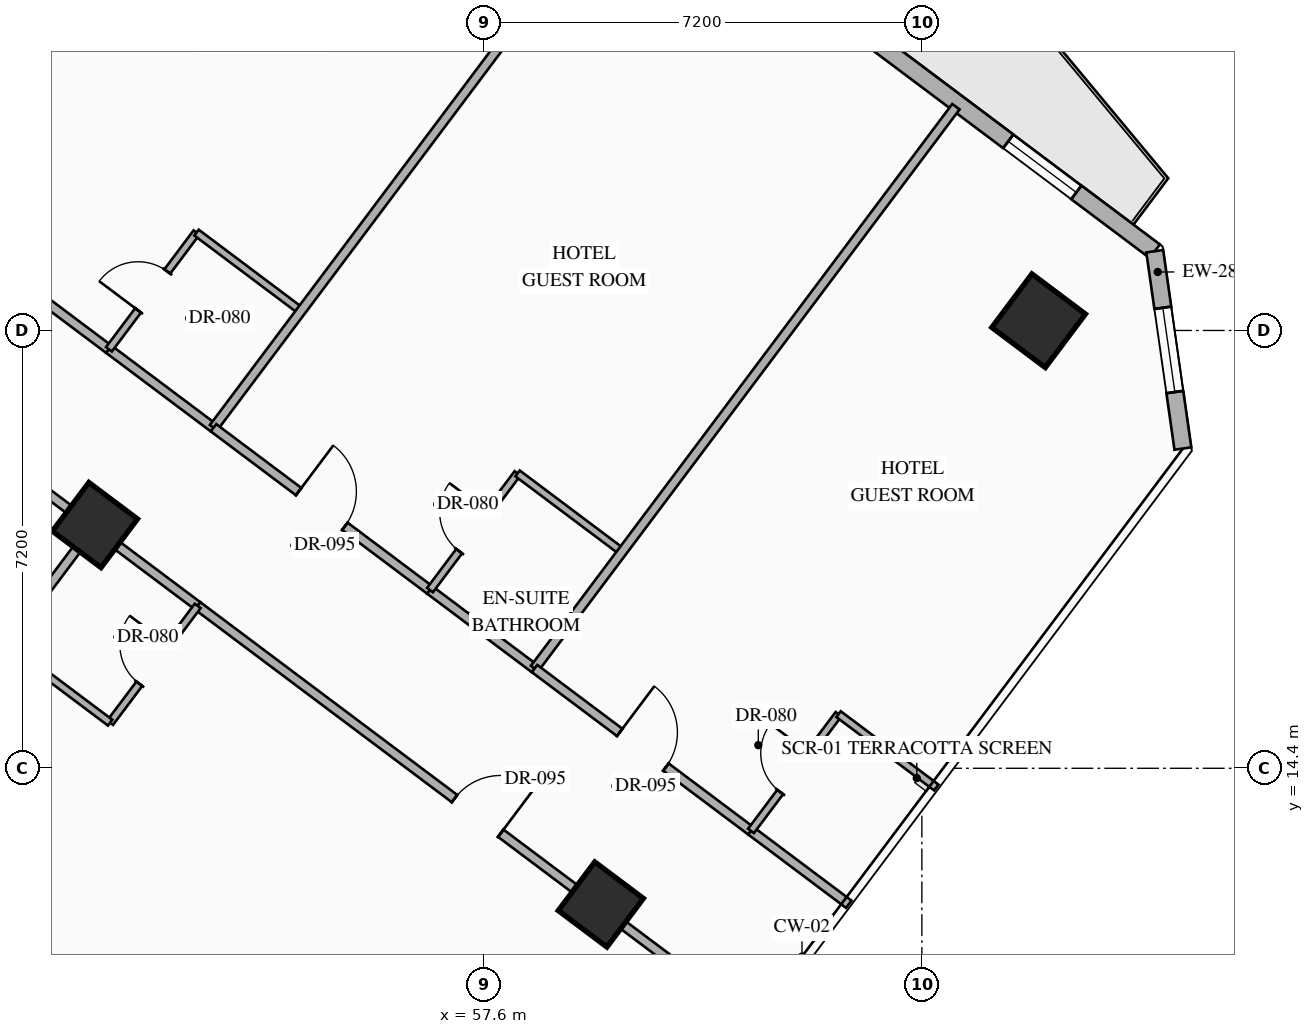
"""IFC4 building model, lengths in metres.
Left out: names, types, materials, properties, quantities, classifications, styles, units other than length and angle.
Written with IfcOpenShell. Run it as: python <this file> out.ifc"""

import sys

from ifc_helpers import new_model, si_unit, direction, frame, frame_2d, origin, origin_2d, place, context, subcontext, project, spatial, rectangle, hollow_rectangle, extrude, element, fill, save


model = new_model("IFC4")
c1 = context("Model", 3, precision=1e-05, world=origin(), true_north=direction((0.0, 1.0)))
c2 = subcontext(c1, "Body", "Model", "MODEL_VIEW")
j1 = project(units=[si_unit("LENGTHUNIT", "METRE"), si_unit("PLANEANGLEUNIT", "RADIAN")], contexts=[c1])
p1 = place(None, origin())
s1 = spatial("IfcSite", under=j1, at=p1, CompositionType="ELEMENT")
p2 = place(p1, origin())
s2 = spatial("IfcBuilding", under=s1, at=p2, CompositionType="ELEMENT")
p3 = place(p2, frame((0.0, 0.0, 39.95)))
s3 = spatial("IfcBuildingStorey", under=s2, at=p3, CompositionType="ELEMENT", Elevation=39.95)
p4 = place(p3, frame((51.2, 18.4, 0.0), z_axis=(0.0, 0.0, 1.0), x_axis=(0.799999996291, -0.600000004945, 0.0)))
e1 = element("IfcColumn", 1, at=p4, inside=s3, PredefinedType="COLUMN", context=c2, shape_type="SweptSolid", body=[
    extrude(hollow_rectangle(XDim=1.0, YDim=1.0, WallThickness=0.038, at=origin_2d()), origin(), (0.0, 0.0, 1.0), 3.35),
])
p5 = place(p3, frame((66.72, 21.76, 0.0), z_axis=(0.0, 0.0, 1.0), x_axis=(0.799999996291, -0.600000004945, 0.0)))
e2 = element("IfcColumn", 2, at=p5, inside=s3, PredefinedType="COLUMN", context=c2, shape_type="SweptSolid", body=[
    extrude(hollow_rectangle(XDim=1.1, YDim=1.1, WallThickness=0.04, at=origin_2d()), origin(), (0.0, 0.0, 1.0), 3.35),
])
p6 = place(p3, frame((59.52, 12.16, 0.0), z_axis=(0.0, 0.0, 1.0), x_axis=(0.799999996291, -0.600000004945, 0.0)))
e3 = element("IfcColumn", 3, at=p6, inside=s3, PredefinedType="COLUMN", context=c2, shape_type="SweptSolid", body=[
    extrude(hollow_rectangle(XDim=1.0, YDim=1.0, WallThickness=0.038, at=origin_2d()), origin(), (0.0, 0.0, 1.0), 3.35),
])
p7 = place(p3, frame((44.86, 40.73, 0.0), z_axis=(0.0, 0.0, 1.0), x_axis=(0.800006902154, -0.599990797017, 0.0)))
e4 = element("IfcWall", 4, at=p7, inside=s3, PredefinedType="STANDARD", context=c2, shape_type="SweptSolid", body=[
    extrude(rectangle(XDim=29.712, YDim=0.28, at=frame_2d((14.856, 0.0))), origin(), (0.0, 0.0, 1.0), 3.13),
])
p8 = place(p7, frame((14.249, 0.0, 0.0)))
e5 = element("IfcOpeningElement", 5, at=p8, cuts=e4, PredefinedType="OPENING", context=c2, shape_type="SweptSolid", body=[
    extrude(rectangle(XDim=1.1, YDim=2.2, at=frame_2d((0.55, 1.1))), frame((0.0, 0.15, 0.0), z_axis=(0.0, -1.0, 0.0), x_axis=(1.0, 0.0, 0.0)), (0.0, 0.0, 1.0), 0.3),
])
p9 = place(p7, frame((1.612, 0.0, 0.85)))
e6 = element("IfcOpeningElement", 6, at=p9, cuts=e4, PredefinedType="OPENING", context=c2, shape_type="SweptSolid", body=[
    extrude(rectangle(XDim=1.4, YDim=1.8, at=frame_2d((0.7, 0.9))), frame((0.0, 0.15, 0.0), z_axis=(0.0, -1.0, 0.0), x_axis=(1.0, 0.0, 0.0)), (0.0, 0.0, 1.0), 0.3),
])
p10 = place(p7, frame((5.667, 0.0, 0.85)))
e7 = element("IfcOpeningElement", 7, at=p10, cuts=e4, PredefinedType="OPENING", context=c2, shape_type="SweptSolid", body=[
    extrude(rectangle(XDim=1.4, YDim=1.8, at=frame_2d((0.7, 0.9))), frame((0.0, 0.15, 0.0), z_axis=(0.0, -1.0, 0.0), x_axis=(1.0, 0.0, 0.0)), (0.0, 0.0, 1.0), 0.3),
])
p11 = place(p7, frame((9.912, 0.0, 0.85)))
e8 = element("IfcOpeningElement", 8, at=p11, cuts=e4, PredefinedType="OPENING", context=c2, shape_type="SweptSolid", body=[
    extrude(rectangle(XDim=1.4, YDim=1.8, at=frame_2d((0.7, 0.9))), frame((0.0, 0.15, 0.0), z_axis=(0.0, -1.0, 0.0), x_axis=(1.0, 0.0, 0.0)), (0.0, 0.0, 1.0), 0.3),
])
p12 = place(p7, frame((19.743, 0.0, 0.85)))
e9 = element("IfcOpeningElement", 9, at=p12, cuts=e4, PredefinedType="OPENING", context=c2, shape_type="SweptSolid", body=[
    extrude(rectangle(XDim=1.4, YDim=1.8, at=frame_2d((0.7, 0.9))), frame((0.0, 0.15, 0.0), z_axis=(0.0, -1.0, 0.0), x_axis=(1.0, 0.0, 0.0)), (0.0, 0.0, 1.0), 0.3),
])
p13 = place(p7, frame((22.645, 0.0, 0.85)))
e10 = element("IfcOpeningElement", 10, at=p13, cuts=e4, PredefinedType="OPENING", context=c2, shape_type="SweptSolid", body=[
    extrude(rectangle(XDim=1.4, YDim=1.8, at=frame_2d((0.7, 0.9))), frame((0.0, 0.15, 0.0), z_axis=(0.0, -1.0, 0.0), x_axis=(1.0, 0.0, 0.0)), (0.0, 0.0, 1.0), 0.3),
])
p14 = place(p7, frame((26.7, 0.0, 0.85)))
e11 = element("IfcOpeningElement", 11, at=p14, cuts=e4, PredefinedType="OPENING", context=c2, shape_type="SweptSolid", body=[
    extrude(rectangle(XDim=1.4, YDim=1.8, at=frame_2d((0.7, 0.9))), frame((0.0, 0.15, 0.0), z_axis=(0.0, -1.0, 0.0), x_axis=(1.0, 0.0, 0.0)), (0.0, 0.0, 1.0), 0.3),
])
p15 = place(p3, frame((68.63, 22.903, 0.0), z_axis=(0.0, 0.0, 1.0), x_axis=(0.141285803956, -0.989968848803, 0.0)))
e12 = element("IfcWall", 12, at=p15, inside=s3, PredefinedType="STANDARD", context=c2, shape_type="SweptSolid", body=[
    extrude(rectangle(XDim=3.278, YDim=0.28, at=frame_2d((1.639, 0.0))), origin(), (0.0, 0.0, 1.0), 3.13),
])
p16 = place(p15, frame((0.939, 0.0, 0.85)))
e13 = element("IfcOpeningElement", 13, at=p16, cuts=e12, PredefinedType="OPENING", context=c2, shape_type="SweptSolid", body=[
    extrude(rectangle(XDim=1.4, YDim=1.8, at=frame_2d((0.7, 0.9))), frame((0.0, 0.15, 0.0), z_axis=(0.0, -1.0, 0.0), x_axis=(1.0, 0.0, 0.0)), (0.0, 0.0, 1.0), 0.3),
])
p17 = place(p3, frame((53.318, 2.487, 0.0), z_axis=(0.0, 0.0, 1.0), x_axis=(-0.800004174678, 0.599994433723, 0.0)))
e14 = element("IfcWall", 14, at=p17, inside=s3, PredefinedType="STANDARD", context=c2, shape_type="SweptSolid", body=[
    extrude(rectangle(XDim=35.089, YDim=0.28, at=frame_2d((17.544, 0.0))), origin(), (0.0, 0.0, 1.0), 3.13),
])
p18 = place(p17, frame((1.931, 0.0, 0.85)))
e15 = element("IfcOpeningElement", 15, at=p18, cuts=e14, PredefinedType="OPENING", context=c2, shape_type="SweptSolid", body=[
    extrude(rectangle(XDim=1.4, YDim=1.8, at=frame_2d((0.7, 0.9))), frame((0.0, 0.15, 0.0), z_axis=(0.0, -1.0, 0.0), x_axis=(1.0, 0.0, 0.0)), (0.0, 0.0, 1.0), 0.3),
])
p19 = place(p17, frame((6.819, 0.0, 0.85)))
e16 = element("IfcOpeningElement", 16, at=p19, cuts=e14, PredefinedType="OPENING", context=c2, shape_type="SweptSolid", body=[
    extrude(rectangle(XDim=1.4, YDim=1.8, at=frame_2d((0.7, 0.9))), frame((0.0, 0.15, 0.0), z_axis=(0.0, -1.0, 0.0), x_axis=(1.0, 0.0, 0.0)), (0.0, 0.0, 1.0), 0.3),
])
p20 = place(p17, frame((11.832, 0.0, 0.85)))
e17 = element("IfcOpeningElement", 17, at=p20, cuts=e14, PredefinedType="OPENING", context=c2, shape_type="SweptSolid", body=[
    extrude(rectangle(XDim=1.4, YDim=1.8, at=frame_2d((0.7, 0.9))), frame((0.0, 0.15, 0.0), z_axis=(0.0, -1.0, 0.0), x_axis=(1.0, 0.0, 0.0)), (0.0, 0.0, 1.0), 0.3),
])
p21 = place(p17, frame((17.647, 0.0, 0.85)))
e18 = element("IfcOpeningElement", 18, at=p21, cuts=e14, PredefinedType="OPENING", context=c2, shape_type="SweptSolid", body=[
    extrude(rectangle(XDim=1.4, YDim=1.8, at=frame_2d((0.7, 0.9))), frame((0.0, 0.15, 0.0), z_axis=(0.0, -1.0, 0.0), x_axis=(1.0, 0.0, 0.0)), (0.0, 0.0, 1.0), 0.3),
])
p22 = place(p17, frame((21.857, 0.0, 0.85)))
e19 = element("IfcOpeningElement", 19, at=p22, cuts=e14, PredefinedType="OPENING", context=c2, shape_type="SweptSolid", body=[
    extrude(rectangle(XDim=1.4, YDim=1.8, at=frame_2d((0.7, 0.9))), frame((0.0, 0.15, 0.0), z_axis=(0.0, -1.0, 0.0), x_axis=(1.0, 0.0, 0.0)), (0.0, 0.0, 1.0), 0.3),
])
p23 = place(p17, frame((26.87, 0.0, 0.85)))
e20 = element("IfcOpeningElement", 20, at=p23, cuts=e14, PredefinedType="OPENING", context=c2, shape_type="SweptSolid", body=[
    extrude(rectangle(XDim=1.4, YDim=1.8, at=frame_2d((0.7, 0.9))), frame((0.0, 0.15, 0.0), z_axis=(0.0, -1.0, 0.0), x_axis=(1.0, 0.0, 0.0)), (0.0, 0.0, 1.0), 0.3),
])
p24 = place(p17, frame((31.757, 0.0, 0.85)))
e21 = element("IfcOpeningElement", 21, at=p24, cuts=e14, PredefinedType="OPENING", context=c2, shape_type="SweptSolid", body=[
    extrude(rectangle(XDim=1.4, YDim=1.8, at=frame_2d((0.7, 0.9))), frame((0.0, 0.15, 0.0), z_axis=(0.0, -1.0, 0.0), x_axis=(1.0, 0.0, 0.0)), (0.0, 0.0, 1.0), 0.3),
])
p25 = place(p3, frame((47.87, 23.96, 0.0), z_axis=(0.0, 0.0, 1.0), x_axis=(0.799993416095, -0.600008778439, 0.0)))
e22 = element("IfcWall", 22, at=p25, inside=s3, PredefinedType="PARTITIONING", context=c2, shape_type="SweptSolid", body=[
    extrude(rectangle(XDim=4.45, YDim=0.15, at=frame_2d((2.225, 0.0))), origin(), (0.0, 0.0, 1.0), 2.775),
])
p26 = place(p25, frame((1.75, 0.0, 0.0)))
e23 = element("IfcOpeningElement", 23, at=p26, cuts=e22, PredefinedType="OPENING", context=c2, shape_type="SweptSolid", body=[
    extrude(rectangle(XDim=0.95, YDim=2.15, at=frame_2d((0.475, 1.075))), frame((0.0, 0.085, 0.0), z_axis=(0.0, -1.0, 0.0), x_axis=(1.0, 0.0, 0.0)), (0.0, 0.0, 1.0), 0.17),
])
p27 = place(p3, frame((51.43, 21.29, 0.0), z_axis=(0.0, 0.0, 1.0), x_axis=(0.79998637334, -0.60001816845, 0.0)))
e24 = element("IfcWall", 24, at=p27, inside=s3, PredefinedType="PARTITIONING", context=c2, shape_type="SweptSolid", body=[
    extrude(rectangle(XDim=2.15, YDim=0.15, at=frame_2d((1.075, 0.0))), origin(), (0.0, 0.0, 1.0), 2.775),
])
p28 = place(p3, frame((51.43, 21.29, 0.0), z_axis=(0.0, 0.0, 1.0), x_axis=(0.600065100855, 0.79995117022, 0.0)))
e25 = element("IfcWall", 25, at=p28, inside=s3, PredefinedType="PARTITIONING", context=c2, shape_type="SweptSolid", body=[
    extrude(rectangle(XDim=2.4, YDim=0.12, at=frame_2d((1.2, 0.0))), origin(), (0.0, 0.0, 1.0), 3.13),
])
p29 = place(p28, frame((0.8, 0.0, 0.0)))
e26 = element("IfcOpeningElement", 26, at=p29, cuts=e25, PredefinedType="OPENING", context=c2, shape_type="SweptSolid", body=[
    extrude(rectangle(XDim=0.8, YDim=2.06, at=frame_2d((0.4, 1.03))), frame((0.0, 0.07, 0.0), z_axis=(0.0, -1.0, 0.0), x_axis=(1.0, 0.0, 0.0)), (0.0, 0.0, 1.0), 0.14),
])
p30 = place(p3, frame((52.87, 23.21, 0.0), z_axis=(0.0, 0.0, 1.0), x_axis=(0.79998637334, -0.60001816845, 0.0)))
e27 = element("IfcWall", 27, at=p30, inside=s3, PredefinedType="PARTITIONING", context=c2, shape_type="SweptSolid", body=[
    extrude(rectangle(XDim=2.15, YDim=0.12, at=frame_2d((1.075, 0.0))), origin(), (0.0, 0.0, 1.0), 3.13),
])
for number, where, z_axis, x_axis in (
    (28, (47.87, 23.96, 0.0), (0.0, 0.0, 1.0), (0.6, 0.8, 0.0)),
    (29, (53.15, 20.0, 0.0), (0.0, 0.0, 1.0), (0.6, 0.8, 0.0)),
):
    element("IfcWall", number, at=place(p3, frame(where, z_axis=z_axis, x_axis=x_axis)), inside=s3, PredefinedType="PARTITIONING", context=c2, shape_type="SweptSolid", body=[
        extrude(rectangle(XDim=11.55, YDim=0.15, at=frame_2d((5.775, 0.0))), origin(), (0.0, 0.0, 1.0), 3.13),
    ])
p31 = place(p3, frame((53.15, 20.0, 0.0), z_axis=(0.0, 0.0, 1.0), x_axis=(0.800013166942, -0.599982443676, 0.0)))
e30 = element("IfcWall", 30, at=p31, inside=s3, PredefinedType="PARTITIONING", context=c2, shape_type="SweptSolid", body=[
    extrude(rectangle(XDim=4.45, YDim=0.15, at=frame_2d((2.225, 0.0))), origin(), (0.0, 0.0, 1.0), 2.775),
])
p32 = place(p31, frame((1.75, 0.0, 0.0)))
e31 = element("IfcOpeningElement", 31, at=p32, cuts=e30, PredefinedType="OPENING", context=c2, shape_type="SweptSolid", body=[
    extrude(rectangle(XDim=0.95, YDim=2.15, at=frame_2d((0.475, 1.075))), frame((0.0, 0.085, 0.0), z_axis=(0.0, -1.0, 0.0), x_axis=(1.0, 0.0, 0.0)), (0.0, 0.0, 1.0), 0.17),
])
p33 = place(p3, frame((56.71, 17.33, 0.0), z_axis=(0.0, 0.0, 1.0), x_axis=(0.79998637334, -0.60001816845, 0.0)))
e32 = element("IfcWall", 32, at=p33, inside=s3, PredefinedType="PARTITIONING", context=c2, shape_type="SweptSolid", body=[
    extrude(rectangle(XDim=2.15, YDim=0.15, at=frame_2d((1.075, 0.0))), origin(), (0.0, 0.0, 1.0), 2.775),
])
p34 = place(p3, frame((56.71, 17.33, 0.0), z_axis=(0.0, 0.0, 1.0), x_axis=(0.6, 0.8, 0.0)))
e33 = element("IfcWall", 33, at=p34, inside=s3, PredefinedType="PARTITIONING", context=c2, shape_type="SweptSolid", body=[
    extrude(rectangle(XDim=2.4, YDim=0.12, at=frame_2d((1.2, 0.0))), origin(), (0.0, 0.0, 1.0), 3.13),
])
p35 = place(p34, frame((0.8, 0.0, 0.0)))
e34 = element("IfcOpeningElement", 34, at=p35, cuts=e33, PredefinedType="OPENING", context=c2, shape_type="SweptSolid", body=[
    extrude(rectangle(XDim=0.8, YDim=2.06, at=frame_2d((0.4, 1.03))), frame((0.0, 0.07, 0.0), z_axis=(0.0, -1.0, 0.0), x_axis=(1.0, 0.0, 0.0)), (0.0, 0.0, 1.0), 0.14),
])
p36 = place(p3, frame((58.15, 19.25, 0.0), z_axis=(0.0, 0.0, 1.0), x_axis=(0.800027249606, -0.599963665473, 0.0)))
e35 = element("IfcWall", 35, at=p36, inside=s3, PredefinedType="PARTITIONING", context=c2, shape_type="SweptSolid", body=[
    extrude(rectangle(XDim=2.15, YDim=0.12, at=frame_2d((1.075, 0.0))), origin(), (0.0, 0.0, 1.0), 3.13),
])
p37 = place(p3, frame((58.43, 16.04, 0.0), z_axis=(0.0, 0.0, 1.0), x_axis=(0.60001014597, 0.799992390422, 0.0)))
e36 = element("IfcWall", 36, at=p37, inside=s3, PredefinedType="PARTITIONING", context=c2, shape_type="SweptSolid", body=[
    extrude(rectangle(XDim=11.55, YDim=0.15, at=frame_2d((5.775, 0.0))), origin(), (0.0, 0.0, 1.0), 3.13),
])
p38 = place(p3, frame((58.43, 16.04, 0.0), z_axis=(0.0, 0.0, 1.0), x_axis=(0.800013166942, -0.599982443676, 0.0)))
e37 = element("IfcWall", 37, at=p38, inside=s3, PredefinedType="PARTITIONING", context=c2, shape_type="SweptSolid", body=[
    extrude(rectangle(XDim=4.45, YDim=0.15, at=frame_2d((2.225, 0.0))), origin(), (0.0, 0.0, 1.0), 2.775),
])
p39 = place(p38, frame((1.75, 0.0, 0.0)))
e38 = element("IfcOpeningElement", 38, at=p39, cuts=e37, PredefinedType="OPENING", context=c2, shape_type="SweptSolid", body=[
    extrude(rectangle(XDim=0.95, YDim=2.15, at=frame_2d((0.475, 1.075))), frame((0.0, 0.085, 0.0), z_axis=(0.0, -1.0, 0.0), x_axis=(1.0, 0.0, 0.0)), (0.0, 0.0, 1.0), 0.17),
])
p40 = place(p3, frame((61.99, 13.37, 0.0), z_axis=(0.0, 0.0, 1.0), x_axis=(0.79997084737, -0.600038868206, 0.0)))
e39 = element("IfcWall", 39, at=p40, inside=s3, PredefinedType="PARTITIONING", context=c2, shape_type="SweptSolid", body=[
    extrude(rectangle(XDim=2.01, YDim=0.15, at=frame_2d((1.005, 0.0))), origin(), (0.0, 0.0, 1.0), 3.13),
])
p41 = place(p3, frame((61.99, 13.37, 0.0), z_axis=(0.0, 0.0, 1.0), x_axis=(0.6, 0.8, 0.0)))
e40 = element("IfcWall", 40, at=p41, inside=s3, PredefinedType="PARTITIONING", context=c2, shape_type="SweptSolid", body=[
    extrude(rectangle(XDim=2.4, YDim=0.12, at=frame_2d((1.2, 0.0))), origin(), (0.0, 0.0, 1.0), 3.13),
])
p42 = place(p41, frame((0.8, 0.0, 0.0)))
e41 = element("IfcOpeningElement", 41, at=p42, cuts=e40, PredefinedType="OPENING", context=c2, shape_type="SweptSolid", body=[
    extrude(rectangle(XDim=0.8, YDim=2.06, at=frame_2d((0.4, 1.03))), frame((0.0, 0.07, 0.0), z_axis=(0.0, -1.0, 0.0), x_axis=(1.0, 0.0, 0.0)), (0.0, 0.0, 1.0), 0.14),
])
p43 = place(p3, frame((63.43, 15.29, 0.0), z_axis=(0.0, 0.0, 1.0), x_axis=(0.800014574191, -0.599980567254, 0.0)))
e42 = element("IfcWall", 42, at=p43, inside=s3, PredefinedType="PARTITIONING", context=c2, shape_type="SweptSolid", body=[
    extrude(rectangle(XDim=2.01, YDim=0.12, at=frame_2d((1.005, 0.0))), origin(), (0.0, 0.0, 1.0), 3.13),
])
p44 = place(p3, frame((49.45, 19.65, 0.0), z_axis=(0.0, 0.0, 1.0), x_axis=(0.800040880289, -0.59994548908, 0.0)))
e43 = element("IfcWall", 43, at=p44, inside=s3, PredefinedType="PARTITIONING", context=c2, shape_type="SweptSolid", body=[
    extrude(rectangle(XDim=2.15, YDim=0.15, at=frame_2d((1.075, 0.0))), origin(), (0.0, 0.0, 1.0), 2.425),
])
p45 = place(p3, frame((44.36, 9.28, 0.0), z_axis=(0.0, 0.0, 1.0), x_axis=(0.599986233332, 0.800010324816, 0.0)))
e44 = element("IfcWall", 44, at=p45, inside=s3, PredefinedType="PARTITIONING", context=c2, shape_type="SweptSolid", body=[
    extrude(rectangle(XDim=11.35, YDim=0.15, at=frame_2d((5.675, 0.0))), origin(), (0.0, 0.0, 1.0), 2.425),
])
p46 = place(p3, frame((51.17, 18.36, 0.0), z_axis=(0.0, 0.0, 1.0), x_axis=(0.79998637334, -0.60001816845, 0.0)))
e45 = element("IfcWall", 45, at=p46, inside=s3, PredefinedType="PARTITIONING", context=c2, shape_type="SweptSolid", body=[
    extrude(rectangle(XDim=2.15, YDim=0.15, at=frame_2d((1.075, 0.0))), origin(), (0.0, 0.0, 1.0), 2.425),
])
p47 = place(p3, frame((52.89, 17.07, 0.0), z_axis=(0.0, 0.0, 1.0), x_axis=(0.8, -0.6, 0.0)))
e46 = element("IfcWall", 46, at=p47, inside=s3, PredefinedType="PARTITIONING", context=c2, shape_type="SweptSolid", body=[
    extrude(rectangle(XDim=11.51, YDim=0.15, at=frame_2d((5.755, 0.0))), origin(), (0.0, 0.0, 1.0), 2.425),
])
p48 = place(p47, frame((5.28, 0.0, 0.0)))
e47 = element("IfcOpeningElement", 47, at=p48, cuts=e46, PredefinedType="OPENING", context=c2, shape_type="SweptSolid", body=[
    extrude(rectangle(XDim=0.95, YDim=2.15, at=frame_2d((0.475, 1.075))), frame((0.0, 0.085, 0.0), z_axis=(0.0, -1.0, 0.0), x_axis=(1.0, 0.0, 0.0)), (0.0, 0.0, 1.0), 0.17),
])
p49 = place(p3, frame((51.45, 15.15, 0.0), z_axis=(0.0, 0.0, 1.0), x_axis=(0.599951172744, 0.800036618114, 0.0)))
e48 = element("IfcWall", 48, at=p49, inside=s3, PredefinedType="PARTITIONING", context=c2, shape_type="SweptSolid", body=[
    extrude(rectangle(XDim=2.4, YDim=0.12, at=frame_2d((1.2, 0.0))), origin(), (0.0, 0.0, 1.0), 3.13),
])
p50 = place(p49, frame((0.8, 0.0, 0.0)))
e49 = element("IfcOpeningElement", 49, at=p50, cuts=e48, PredefinedType="OPENING", context=c2, shape_type="SweptSolid", body=[
    extrude(rectangle(XDim=0.8, YDim=2.06, at=frame_2d((0.4, 1.03))), frame((0.0, 0.07, 0.0), z_axis=(0.0, -1.0, 0.0), x_axis=(1.0, 0.0, 0.0)), (0.0, 0.0, 1.0), 0.14),
])
p51 = place(p3, frame((49.73, 16.44, 0.0), z_axis=(0.0, 0.0, 1.0), x_axis=(0.79998637334, -0.60001816845, 0.0)))
e50 = element("IfcWall", 50, at=p51, inside=s3, PredefinedType="PARTITIONING", context=c2, shape_type="SweptSolid", body=[
    extrude(rectangle(XDim=2.15, YDim=0.12, at=frame_2d((1.075, 0.0))), origin(), (0.0, 0.0, 1.0), 3.13),
])
p52 = place(p14, origin())
e51 = element("IfcWindow", 51, at=p52, inside=s3, PartitioningType="SINGLE_PANEL", PredefinedType="WINDOW", context=c2, shape_type="SweptSolid", body=[
    extrude(rectangle(XDim=1.4, YDim=1.8, at=frame_2d((0.7, 0.9))), frame((0.0, 0.03, 0.0), z_axis=(0.0, -1.0, 0.0), x_axis=(1.0, 0.0, 0.0)), (0.0, 0.0, 1.0), 0.06),
])
fill(e11, e51)
p53 = place(p16, origin())
e52 = element("IfcWindow", 52, at=p53, inside=s3, PartitioningType="SINGLE_PANEL", PredefinedType="WINDOW", context=c2, shape_type="SweptSolid", body=[
    extrude(rectangle(XDim=1.4, YDim=1.8, at=frame_2d((0.7, 0.9))), frame((0.0, 0.03, 0.0), z_axis=(0.0, -1.0, 0.0), x_axis=(1.0, 0.0, 0.0)), (0.0, 0.0, 1.0), 0.06),
])
fill(e13, e52)
p54 = place(p29, origin())
e53 = element("IfcDoor", 53, at=p54, inside=s3, OperationType="SINGLE_SWING_LEFT", PredefinedType="DOOR", context=c2, shape_type="SweptSolid", body=[
    extrude(rectangle(XDim=0.8, YDim=2.06, at=frame_2d((0.4, 1.03))), frame((0.0, 0.025, 0.0), z_axis=(0.0, -1.0, 0.0), x_axis=(1.0, 0.0, 0.0)), (0.0, 0.0, 1.0), 0.05),
])
fill(e26, e53)
p55 = place(p32, origin())
e54 = element("IfcDoor", 54, at=p55, inside=s3, OperationType="SINGLE_SWING_LEFT", PredefinedType="DOOR", context=c2, shape_type="SweptSolid", body=[
    extrude(rectangle(XDim=0.95, YDim=2.15, at=frame_2d((0.475, 1.075))), frame((0.0, 0.025, 0.0), z_axis=(0.0, -1.0, 0.0), x_axis=(1.0, 0.0, 0.0)), (0.0, 0.0, 1.0), 0.05),
])
fill(e31, e54)
p56 = place(p35, origin())
e55 = element("IfcDoor", 55, at=p56, inside=s3, OperationType="SINGLE_SWING_RIGHT", PredefinedType="DOOR", context=c2, shape_type="SweptSolid", body=[
    extrude(rectangle(XDim=0.8, YDim=2.06, at=frame_2d((0.4, 1.03))), frame((0.0, 0.025, 0.0), z_axis=(0.0, -1.0, 0.0), x_axis=(1.0, 0.0, 0.0)), (0.0, 0.0, 1.0), 0.05),
])
fill(e34, e55)
p57 = place(p39, origin())
e56 = element("IfcDoor", 56, at=p57, inside=s3, OperationType="SINGLE_SWING_LEFT", PredefinedType="DOOR", context=c2, shape_type="SweptSolid", body=[
    extrude(rectangle(XDim=0.95, YDim=2.15, at=frame_2d((0.475, 1.075))), frame((0.0, 0.025, 0.0), z_axis=(0.0, -1.0, 0.0), x_axis=(1.0, 0.0, 0.0)), (0.0, 0.0, 1.0), 0.05),
])
fill(e38, e56)
p58 = place(p42, origin())
e57 = element("IfcDoor", 57, at=p58, inside=s3, OperationType="SINGLE_SWING_RIGHT", PredefinedType="DOOR", context=c2, shape_type="SweptSolid", body=[
    extrude(rectangle(XDim=0.8, YDim=2.06, at=frame_2d((0.4, 1.03))), frame((0.0, 0.025, 0.0), z_axis=(0.0, -1.0, 0.0), x_axis=(1.0, 0.0, 0.0)), (0.0, 0.0, 1.0), 0.05),
])
fill(e41, e57)
p59 = place(p48, origin())
e58 = element("IfcDoor", 58, at=p59, inside=s3, OperationType="SINGLE_SWING_RIGHT", PredefinedType="DOOR", context=c2, shape_type="SweptSolid", body=[
    extrude(rectangle(XDim=0.95, YDim=2.15, at=frame_2d((0.475, 1.075))), frame((0.0, 0.025, 0.0), z_axis=(0.0, -1.0, 0.0), x_axis=(1.0, 0.0, 0.0)), (0.0, 0.0, 1.0), 0.05),
])
fill(e47, e58)
p60 = place(p50, origin())
e59 = element("IfcDoor", 59, at=p60, inside=s3, OperationType="SINGLE_SWING_RIGHT", PredefinedType="DOOR", context=c2, shape_type="SweptSolid", body=[
    extrude(rectangle(XDim=0.8, YDim=2.06, at=frame_2d((0.4, 1.03))), frame((0.0, 0.025, 0.0), z_axis=(0.0, -1.0, 0.0), x_axis=(1.0, 0.0, 0.0)), (0.0, 0.0, 1.0), 0.05),
])
fill(e49, e59)
save(model, sys.argv[1])
